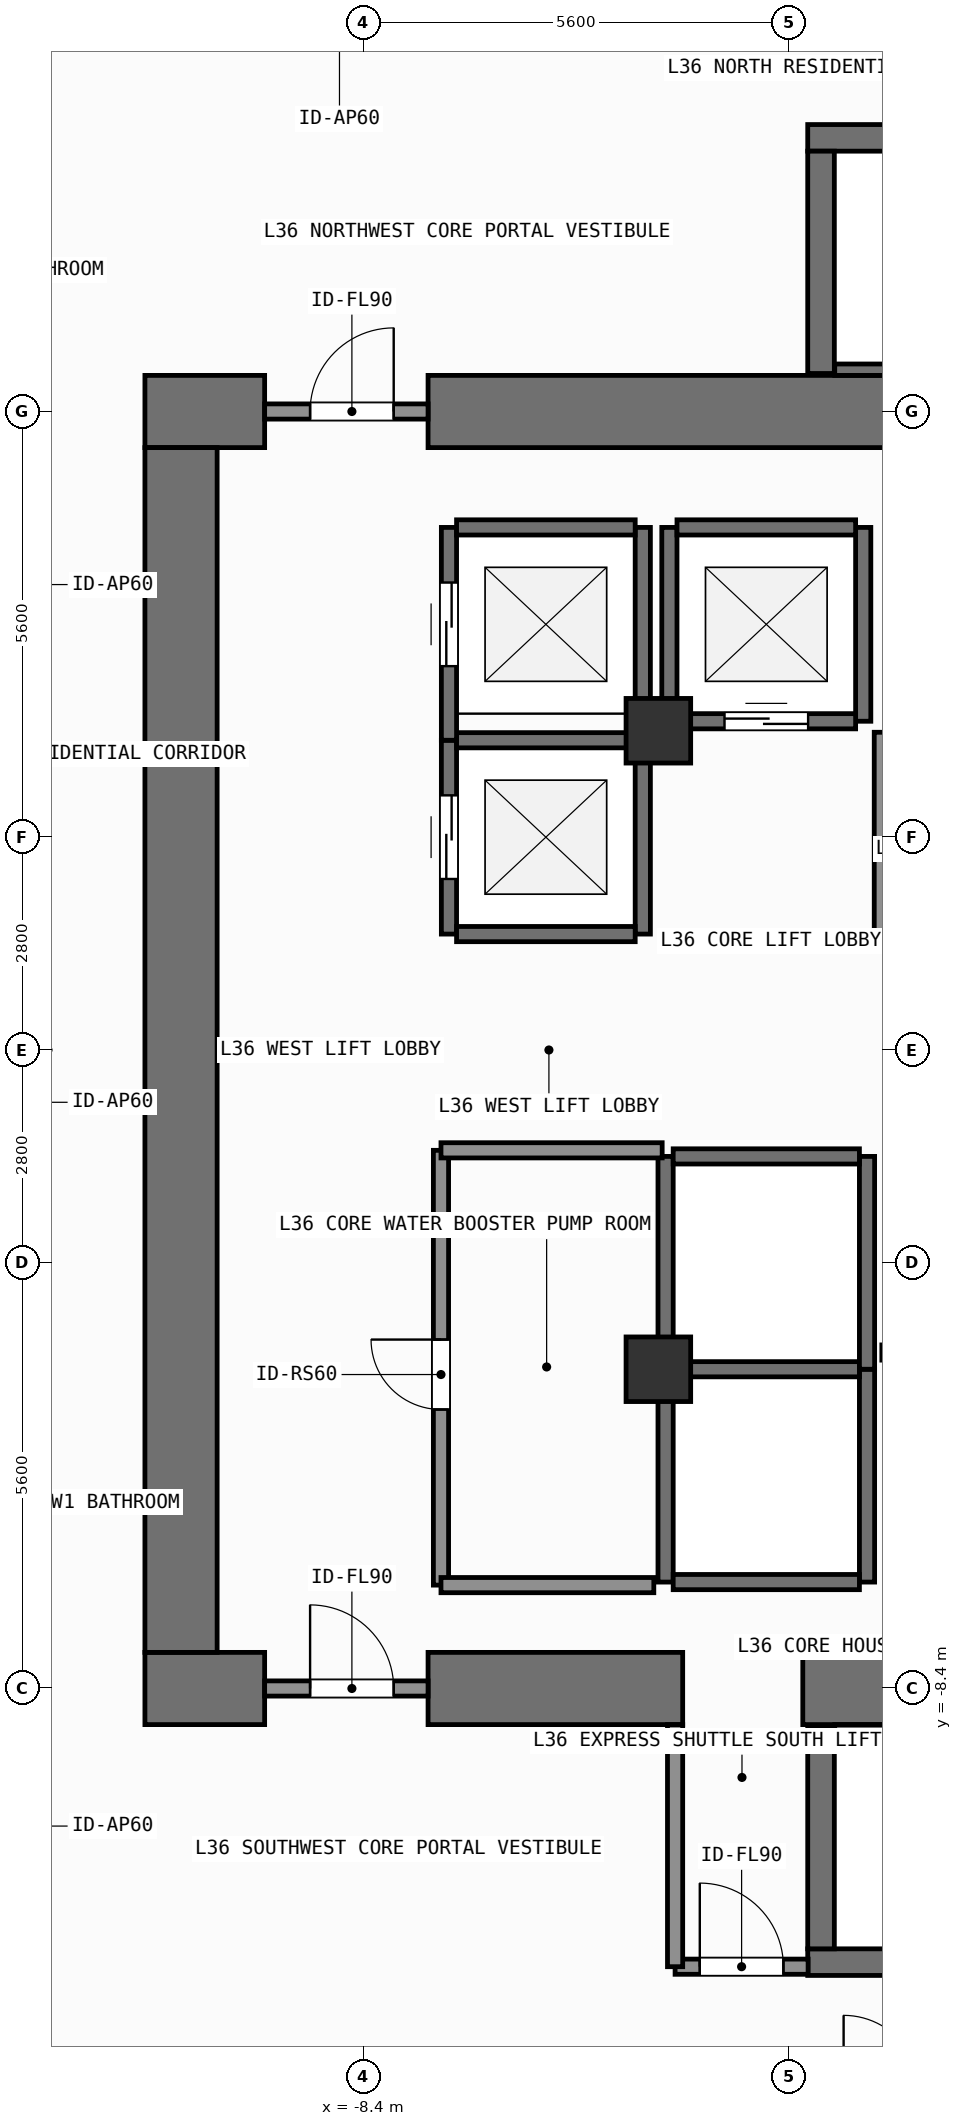
"""IFC4 building model, lengths in metres.
Left out: names, types, materials, properties, quantities, classifications, styles, units other than length and angle.
Written with IfcOpenShell. Run it as: python <this file> out.ifc"""

import sys

from ifc_helpers import new_model, si_unit, direction, frame, frame_2d, origin, origin_2d, place, context, subcontext, project, spatial, rectangle, extrude, element, fill, save


model = new_model("IFC4")
c1 = context("Model", 3, precision=1e-05, world=origin(), true_north=direction((0.0, 1.0)))
c2 = subcontext(c1, "Body", "Model", "MODEL_VIEW")
j1 = project(units=[si_unit("LENGTHUNIT", "METRE"), si_unit("PLANEANGLEUNIT", "RADIAN")], contexts=[c1])
p1 = place(None, origin())
s1 = spatial("IfcSite", under=j1, at=p1, CompositionType="ELEMENT")
p2 = place(p1, origin())
s2 = spatial("IfcBuilding", under=s1, at=p2, CompositionType="ELEMENT")
p3 = place(p2, frame((0.0, 0.0, 144.6)))
s3 = spatial("IfcBuildingStorey", under=s2, at=p3, CompositionType="ELEMENT", Elevation=144.6)
p4 = place(p3, frame((-11.275, -8.4, 0.0), z_axis=(0.0, 0.0, 1.0), x_axis=(1.0, 0.0, 0.0)))
e1 = element("IfcWall", 1, at=p4, inside=s3, PredefinedType="SHEAR", context=c2, shape_type="SweptSolid", body=[
    extrude(rectangle(XDim=1.575, YDim=0.95, at=frame_2d((0.788, 0.0))), origin(), (0.0, 0.0, 1.0), 3.9),
])
p5 = place(p3, frame((-7.55, -8.4, 0.0), z_axis=(0.0, 0.0, 1.0), x_axis=(1.0, 0.0, 0.0)))
e2 = element("IfcWall", 2, at=p5, inside=s3, PredefinedType="SHEAR", context=c2, shape_type="SweptSolid", body=[
    extrude(rectangle(XDim=3.35, YDim=0.95, at=frame_2d((1.675, 0.0))), origin(), (0.0, 0.0, 1.0), 3.9),
])
p6 = place(p3, frame((-2.62, -8.4, 0.0), z_axis=(0.0, 0.0, 1.0), x_axis=(1.0, 0.0, 0.0)))
e3 = element("IfcWall", 3, at=p6, inside=s3, PredefinedType="SHEAR", context=c2, shape_type="SweptSolid", body=[
    extrude(rectangle(XDim=7.27, YDim=0.95, at=frame_2d((3.635, 0.0))), origin(), (0.0, 0.0, 1.0), 3.9),
])
p7 = place(p3, frame((-11.275, 8.4, 0.0), z_axis=(0.0, 0.0, 1.0), x_axis=(1.0, 0.0, 0.0)))
e4 = element("IfcWall", 4, at=p7, inside=s3, PredefinedType="SHEAR", context=c2, shape_type="SweptSolid", body=[
    extrude(rectangle(XDim=1.575, YDim=0.95, at=frame_2d((0.788, 0.0))), origin(), (0.0, 0.0, 1.0), 3.9),
])
p8 = place(p3, frame((-7.55, 8.4, 0.0), z_axis=(0.0, 0.0, 1.0), x_axis=(1.0, 0.0, 0.0)))
e5 = element("IfcWall", 5, at=p8, inside=s3, PredefinedType="SHEAR", context=c2, shape_type="SweptSolid", body=[
    extrude(rectangle(XDim=16.425, YDim=0.95, at=frame_2d((8.212, 0.0))), origin(), (0.0, 0.0, 1.0), 3.9),
])
p9 = place(p3, frame((-10.8, -7.925, 0.0), z_axis=(0.0, 0.0, 1.0), x_axis=(0.0, 1.0, 0.0)))
e6 = element("IfcWall", 6, at=p9, inside=s3, PredefinedType="SHEAR", context=c2, shape_type="SweptSolid", body=[
    extrude(rectangle(XDim=15.85, YDim=0.95, at=frame_2d((7.925, 0.0))), origin(), (0.0, 0.0, 1.0), 3.9),
])
p10 = place(p3, frame((-2.555, -12.0, 0.0), z_axis=(0.0, 0.0, 1.0), x_axis=(1.0, 0.0, 0.0)))
e7 = element("IfcWall", 7, at=p10, inside=s3, PredefinedType="SHEAR", context=c2, shape_type="SweptSolid", body=[
    extrude(rectangle(XDim=7.31, YDim=0.35, at=frame_2d((3.655, 0.0))), origin(), (0.0, 0.0, 1.0), 3.9),
])
p11 = place(p3, frame((-2.2, -8.95, 0.0), z_axis=(0.0, 0.0, 1.0), x_axis=(1.0, 0.0, 0.0)))
e8 = element("IfcWall", 8, at=p11, inside=s3, PredefinedType="SHEAR", context=c2, shape_type="SweptSolid", body=[
    extrude(rectangle(XDim=6.6, YDim=0.15, at=frame_2d((3.3, 0.0))), origin(), (0.0, 0.0, 1.0), 3.9),
])
p12 = place(p3, frame((-2.38, -11.825, 0.0), z_axis=(0.0, 0.0, 1.0), x_axis=(0.0, 1.0, 0.0)))
e9 = element("IfcWall", 9, at=p12, inside=s3, PredefinedType="SHEAR", context=c2, shape_type="SweptSolid", body=[
    extrude(rectangle(XDim=2.925, YDim=0.35, at=frame_2d((1.462, 0.0))), origin(), (0.0, 0.0, 1.0), 3.9),
])
p13 = place(p3, frame((-2.555, 12.0, 0.0), z_axis=(0.0, 0.0, 1.0), x_axis=(1.0, 0.0, 0.0)))
e10 = element("IfcWall", 10, at=p13, inside=s3, PredefinedType="SHEAR", context=c2, shape_type="SweptSolid", body=[
    extrude(rectangle(XDim=7.31, YDim=0.35, at=frame_2d((3.655, 0.0))), origin(), (0.0, 0.0, 1.0), 3.9),
])
p14 = place(p3, frame((-2.2, 8.95, 0.0), z_axis=(0.0, 0.0, 1.0), x_axis=(1.0, 0.0, 0.0)))
e11 = element("IfcWall", 11, at=p14, inside=s3, PredefinedType="SHEAR", context=c2, shape_type="SweptSolid", body=[
    extrude(rectangle(XDim=6.6, YDim=0.15, at=frame_2d((3.3, 0.0))), origin(), (0.0, 0.0, 1.0), 3.9),
])
p15 = place(p3, frame((-2.38, 8.9, 0.0), z_axis=(0.0, 0.0, 1.0), x_axis=(0.0, 1.0, 0.0)))
e12 = element("IfcWall", 12, at=p15, inside=s3, PredefinedType="SHEAR", context=c2, shape_type="SweptSolid", body=[
    extrude(rectangle(XDim=2.925, YDim=0.35, at=frame_2d((1.462, 0.0))), origin(), (0.0, 0.0, 1.0), 3.9),
])
for number, where, z_axis, x_axis in (
    (13, (-4.52, -4.2, 0.0), (0.0, 0.0, 1.0), (1.0, 0.0, 0.0)),
    (14, (-4.52, 4.2, 0.0), (0.0, 0.0, 1.0), (1.0, 0.0, 0.0)),
):
    element("IfcColumn", number, at=place(p3, frame(where, z_axis=z_axis, x_axis=x_axis)), inside=s3, PredefinedType="COLUMN", context=c2, shape_type="SweptSolid", body=[
        extrude(rectangle(XDim=0.85, YDim=0.85, at=origin_2d()), origin(), (0.0, 0.0, 1.0), 3.9),
    ])
p16 = place(p3, frame((-7.275, 1.525, 0.0), z_axis=(0.0, 0.0, 1.0), x_axis=(0.0, 1.0, 0.0)))
e15 = element("IfcWall", 15, at=p16, inside=s3, PredefinedType="SHEAR", context=c2, shape_type="SweptSolid", body=[
    extrude(rectangle(XDim=2.55, YDim=0.2, at=frame_2d((1.275, 0.0))), origin(), (0.0, 0.0, 1.0), 3.68),
])
p17 = place(p16, frame((0.725, 0.0, 0.0)))
e16 = element("IfcOpeningElement", 16, at=p17, cuts=e15, PredefinedType="OPENING", context=c2, shape_type="SweptSolid", body=[
    extrude(rectangle(XDim=1.1, YDim=2.2, at=frame_2d((0.55, 1.1))), frame((0.0, 0.11, 0.0), z_axis=(0.0, -1.0, 0.0), x_axis=(1.0, 0.0, 0.0)), (0.0, 0.0, 1.0), 0.22),
])
p18 = place(p3, frame((-4.725, 1.525, 0.0), z_axis=(0.0, 0.0, 1.0), x_axis=(0.0, 1.0, 0.0)))
e17 = element("IfcWall", 17, at=p18, inside=s3, PredefinedType="SHEAR", context=c2, shape_type="SweptSolid", body=[
    extrude(rectangle(XDim=2.55, YDim=0.2, at=frame_2d((1.275, 0.0))), origin(), (0.0, 0.0, 1.0), 3.68),
])
for number, where, z_axis, x_axis in (
    (18, (-7.175, 1.525, 0.0), (0.0, 0.0, 1.0), (1.0, 0.0, 0.0)),
    (19, (-7.175, 4.075, 0.0), (0.0, 0.0, 1.0), (1.0, 0.0, 0.0)),
):
    element("IfcWall", number, at=place(p3, frame(where, z_axis=z_axis, x_axis=x_axis)), inside=s3, PredefinedType="SHEAR", context=c2, shape_type="SweptSolid", body=[
        extrude(rectangle(XDim=2.35, YDim=0.2, at=frame_2d((1.175, 0.0))), origin(), (0.0, 0.0, 1.0), 3.68),
    ])
p19 = place(p3, frame((-7.275, 4.075, 0.0), z_axis=(0.0, 0.0, 1.0), x_axis=(0.0, 1.0, 0.0)))
e20 = element("IfcWall", 20, at=p19, inside=s3, PredefinedType="SHEAR", context=c2, shape_type="SweptSolid", body=[
    extrude(rectangle(XDim=2.8, YDim=0.2, at=frame_2d((1.4, 0.0))), origin(), (0.0, 0.0, 1.0), 3.68),
])
p20 = place(p19, frame((0.975, 0.0, 0.0)))
e21 = element("IfcOpeningElement", 21, at=p20, cuts=e20, PredefinedType="OPENING", context=c2, shape_type="SweptSolid", body=[
    extrude(rectangle(XDim=1.1, YDim=2.2, at=frame_2d((0.55, 1.1))), frame((0.0, 0.11, 0.0), z_axis=(0.0, -1.0, 0.0), x_axis=(1.0, 0.0, 0.0)), (0.0, 0.0, 1.0), 0.22),
])
p21 = place(p3, frame((-4.725, 4.075, 0.0), z_axis=(0.0, 0.0, 1.0), x_axis=(0.0, 1.0, 0.0)))
e22 = element("IfcWall", 22, at=p21, inside=s3, PredefinedType="SHEAR", context=c2, shape_type="SweptSolid", body=[
    extrude(rectangle(XDim=2.8, YDim=0.2, at=frame_2d((1.4, 0.0))), origin(), (0.0, 0.0, 1.0), 3.68),
])
p22 = place(p3, frame((-7.175, 6.875, 0.0), z_axis=(0.0, 0.0, 1.0), x_axis=(1.0, 0.0, 0.0)))
e23 = element("IfcWall", 23, at=p22, inside=s3, PredefinedType="SHEAR", context=c2, shape_type="SweptSolid", body=[
    extrude(rectangle(XDim=2.35, YDim=0.2, at=frame_2d((1.175, 0.0))), origin(), (0.0, 0.0, 1.0), 3.68),
])
for number, where, z_axis, x_axis in (
    (24, (-4.375, 4.325, 0.0), (0.0, 0.0, 1.0), (0.0, 1.0, 0.0)),
    (25, (-1.825, 4.325, 0.0), (0.0, 0.0, 1.0), (0.0, 1.0, 0.0)),
):
    element("IfcWall", number, at=place(p3, frame(where, z_axis=z_axis, x_axis=x_axis)), inside=s3, PredefinedType="SHEAR", context=c2, shape_type="SweptSolid", body=[
        extrude(rectangle(XDim=2.55, YDim=0.2, at=frame_2d((1.275, 0.0))), origin(), (0.0, 0.0, 1.0), 3.68),
    ])
p23 = place(p3, frame((-4.275, 4.325, 0.0), z_axis=(0.0, 0.0, 1.0), x_axis=(1.0, 0.0, 0.0)))
e26 = element("IfcWall", 26, at=p23, inside=s3, PredefinedType="SHEAR", context=c2, shape_type="SweptSolid", body=[
    extrude(rectangle(XDim=2.35, YDim=0.2, at=frame_2d((1.175, 0.0))), origin(), (0.0, 0.0, 1.0), 3.68),
])
p24 = place(p23, frame((0.625, 0.0, 0.0)))
e27 = element("IfcOpeningElement", 27, at=p24, cuts=e26, PredefinedType="OPENING", context=c2, shape_type="SweptSolid", body=[
    extrude(rectangle(XDim=1.1, YDim=2.2, at=frame_2d((0.55, 1.1))), frame((0.0, 0.11, 0.0), z_axis=(0.0, -1.0, 0.0), x_axis=(1.0, 0.0, 0.0)), (0.0, 0.0, 1.0), 0.22),
])
p25 = place(p3, frame((-4.275, 6.875, 0.0), z_axis=(0.0, 0.0, 1.0), x_axis=(1.0, 0.0, 0.0)))
e28 = element("IfcWall", 28, at=p25, inside=s3, PredefinedType="SHEAR", context=c2, shape_type="SweptSolid", body=[
    extrude(rectangle(XDim=2.35, YDim=0.2, at=frame_2d((1.175, 0.0))), origin(), (0.0, 0.0, 1.0), 3.68),
])
for number, where, z_axis, x_axis in (
    (29, (-4.425, -7.0, 0.0), (0.0, 0.0, 1.0), (0.0, 1.0, 0.0)),
    (30, (-1.775, -7.0, 0.0), (0.0, 0.0, 1.0), (0.0, 1.0, 0.0)),
):
    element("IfcWall", number, at=place(p3, frame(where, z_axis=z_axis, x_axis=x_axis)), inside=s3, PredefinedType="SHEAR", context=c2, shape_type="SweptSolid", body=[
        extrude(rectangle(XDim=2.8, YDim=0.2, at=frame_2d((1.4, 0.0))), origin(), (0.0, 0.0, 1.0), 3.68),
    ])
for number, where, z_axis, x_axis in (
    (31, (-4.325, -7.0, 0.0), (0.0, 0.0, 1.0), (1.0, 0.0, 0.0)),
    (32, (-4.325, -4.2, 0.0), (0.0, 0.0, 1.0), (1.0, 0.0, 0.0)),
):
    element("IfcWall", number, at=place(p3, frame(where, z_axis=z_axis, x_axis=x_axis)), inside=s3, PredefinedType="SHEAR", context=c2, shape_type="SweptSolid", body=[
        extrude(rectangle(XDim=2.45, YDim=0.2, at=frame_2d((1.225, 0.0))), origin(), (0.0, 0.0, 1.0), 3.68),
    ])
for number, where, z_axis, x_axis in (
    (33, (-4.425, -4.2, 0.0), (0.0, 0.0, 1.0), (0.0, 1.0, 0.0)),
    (34, (-1.775, -4.2, 0.0), (0.0, 0.0, 1.0), (0.0, 1.0, 0.0)),
):
    element("IfcWall", number, at=place(p3, frame(where, z_axis=z_axis, x_axis=x_axis)), inside=s3, PredefinedType="SHEAR", context=c2, shape_type="SweptSolid", body=[
        extrude(rectangle(XDim=2.8, YDim=0.2, at=frame_2d((1.4, 0.0))), origin(), (0.0, 0.0, 1.0), 3.68),
    ])
p26 = place(p3, frame((-4.325, -1.4, 0.0), z_axis=(0.0, 0.0, 1.0), x_axis=(1.0, 0.0, 0.0)))
e35 = element("IfcWall", 35, at=p26, inside=s3, PredefinedType="SHEAR", context=c2, shape_type="SweptSolid", body=[
    extrude(rectangle(XDim=2.45, YDim=0.2, at=frame_2d((1.225, 0.0))), origin(), (0.0, 0.0, 1.0), 3.68),
])
p27 = place(p3, frame((-9.7, -8.4, 0.0), z_axis=(0.0, 0.0, 1.0), x_axis=(1.0, 0.0, 0.0)))
e36 = element("IfcWall", 36, at=p27, inside=s3, PredefinedType="SOLIDWALL", context=c2, shape_type="SweptSolid", body=[
    extrude(rectangle(XDim=2.15, YDim=0.2, at=frame_2d((1.075, 0.0))), origin(), (0.0, 0.0, 1.0), 2.72),
])
p28 = place(p27, frame((0.598, 0.0, 0.0)))
e37 = element("IfcOpeningElement", 37, at=p28, cuts=e36, PredefinedType="OPENING", context=c2, shape_type="SweptSolid", body=[
    extrude(rectangle(XDim=1.1, YDim=2.15, at=frame_2d((0.55, 1.075))), frame((0.0, 0.11, 0.0), z_axis=(0.0, -1.0, 0.0), x_axis=(1.0, 0.0, 0.0)), (0.0, 0.0, 1.0), 0.22),
])
p29 = place(p3, frame((-9.7, 8.4, 0.0), z_axis=(0.0, 0.0, 1.0), x_axis=(1.0, 0.0, 0.0)))
e38 = element("IfcWall", 38, at=p29, inside=s3, PredefinedType="SOLIDWALL", context=c2, shape_type="SweptSolid", body=[
    extrude(rectangle(XDim=2.15, YDim=0.2, at=frame_2d((1.075, 0.0))), origin(), (0.0, 0.0, 1.0), 2.72),
])
p30 = place(p29, frame((0.598, 0.0, 0.0)))
e39 = element("IfcOpeningElement", 39, at=p30, cuts=e38, PredefinedType="OPENING", context=c2, shape_type="SweptSolid", body=[
    extrude(rectangle(XDim=1.1, YDim=2.15, at=frame_2d((0.55, 1.075))), frame((0.0, 0.11, 0.0), z_axis=(0.0, -1.0, 0.0), x_axis=(1.0, 0.0, 0.0)), (0.0, 0.0, 1.0), 0.22),
])
p31 = place(p3, frame((-4.3, -12.06, 0.0), z_axis=(0.0, 0.0, 1.0), x_axis=(1.0, 0.0, 0.0)))
e40 = element("IfcWall", 40, at=p31, inside=s3, PredefinedType="SOLIDWALL", context=c2, shape_type="SweptSolid", body=[
    extrude(rectangle(XDim=1.75, YDim=0.2, at=frame_2d((0.875, 0.0))), origin(), (0.0, 0.0, 1.0), 3.68),
])
p32 = place(p31, frame((0.325, 0.0, 0.0)))
e41 = element("IfcOpeningElement", 41, at=p32, cuts=e40, PredefinedType="OPENING", context=c2, shape_type="SweptSolid", body=[
    extrude(rectangle(XDim=1.1, YDim=2.15, at=frame_2d((0.55, 1.075))), frame((0.0, 0.11, 0.0), z_axis=(0.0, -1.0, 0.0), x_axis=(1.0, 0.0, 0.0)), (0.0, 0.0, 1.0), 0.22),
])
p33 = place(p3, frame((-7.38, -7.04, 0.0), z_axis=(0.0, 0.0, 1.0), x_axis=(0.0, 1.0, 0.0)))
e42 = element("IfcWall", 42, at=p33, inside=s3, PredefinedType="SOLIDWALL", context=c2, shape_type="SweptSolid", body=[
    extrude(rectangle(XDim=5.72, YDim=0.2, at=frame_2d((2.86, 0.0))), origin(), (0.0, 0.0, 1.0), 3.68),
])
p34 = place(p33, frame((2.31, 0.0, 0.0)))
e43 = element("IfcOpeningElement", 43, at=p34, cuts=e42, PredefinedType="OPENING", context=c2, shape_type="SweptSolid", body=[
    extrude(rectangle(XDim=0.92, YDim=2.1, at=frame_2d((0.46, 1.05))), frame((0.0, 0.11, 0.0), z_axis=(0.0, -1.0, 0.0), x_axis=(1.0, 0.0, 0.0)), (0.0, 0.0, 1.0), 0.22),
])
p35 = place(p3, frame((-4.3, -12.06, 0.0), z_axis=(0.0, 0.0, 1.0), x_axis=(0.0, 1.0, 0.0)))
e44 = element("IfcWall", 44, at=p35, inside=s3, PredefinedType="SOLIDWALL", context=c2, shape_type="SweptSolid", body=[
    extrude(rectangle(XDim=3.185, YDim=0.2, at=frame_2d((1.593, 0.0))), origin(), (0.0, 0.0, 1.0), 3.68),
])
p36 = place(p3, frame((-7.38, -1.32, 0.0), z_axis=(0.0, 0.0, 1.0), x_axis=(1.0, 0.0, 0.0)))
e45 = element("IfcWall", 45, at=p36, inside=s3, PredefinedType="SOLIDWALL", context=c2, shape_type="SweptSolid", body=[
    extrude(rectangle(XDim=2.91, YDim=0.2, at=frame_2d((1.455, 0.0))), origin(), (0.0, 0.0, 1.0), 3.68),
])
p37 = place(p3, frame((-1.58, 1.48, 0.0), z_axis=(0.0, 0.0, 1.0), x_axis=(0.0, 1.0, 0.0)))
e46 = element("IfcWall", 46, at=p37, inside=s3, PredefinedType="SOLIDWALL", context=c2, shape_type="SweptSolid", body=[
    extrude(rectangle(XDim=2.7, YDim=0.2, at=frame_2d((1.35, 0.0))), origin(), (0.0, 0.0, 1.0), 3.68),
])
p38 = place(p3, frame((-7.38, -7.04, 0.0), z_axis=(0.0, 0.0, 1.0), x_axis=(1.0, 0.0, 0.0)))
e47 = element("IfcWall", 47, at=p38, inside=s3, PredefinedType="SOLIDWALL", context=c2, shape_type="SweptSolid", body=[
    extrude(rectangle(XDim=2.8, YDim=0.2, at=frame_2d((1.4, 0.0))), origin(), (0.0, 0.0, 1.0), 3.68),
])
p39 = place(p17, origin())
e48 = element("IfcDoor", 48, at=p39, inside=s3, OperationType="SLIDING_TO_LEFT", PredefinedType="DOOR", context=c2, shape_type="SweptSolid", body=[
    extrude(rectangle(XDim=1.1, YDim=2.2, at=frame_2d((0.55, 1.1))), frame((0.0, 0.025, 0.0), z_axis=(0.0, -1.0, 0.0), x_axis=(1.0, 0.0, 0.0)), (0.0, 0.0, 1.0), 0.05),
])
fill(e16, e48)
p40 = place(p20, origin())
e49 = element("IfcDoor", 49, at=p40, inside=s3, OperationType="SLIDING_TO_LEFT", PredefinedType="DOOR", context=c2, shape_type="SweptSolid", body=[
    extrude(rectangle(XDim=1.1, YDim=2.2, at=frame_2d((0.55, 1.1))), frame((0.0, 0.025, 0.0), z_axis=(0.0, -1.0, 0.0), x_axis=(1.0, 0.0, 0.0)), (0.0, 0.0, 1.0), 0.05),
])
fill(e21, e49)
p41 = place(p24, origin())
e50 = element("IfcDoor", 50, at=p41, inside=s3, OperationType="SLIDING_TO_LEFT", PredefinedType="DOOR", context=c2, shape_type="SweptSolid", body=[
    extrude(rectangle(XDim=1.1, YDim=2.2, at=frame_2d((0.55, 1.1))), frame((0.0, 0.025, 0.0), z_axis=(0.0, -1.0, 0.0), x_axis=(1.0, 0.0, 0.0)), (0.0, 0.0, 1.0), 0.05),
])
fill(e27, e50)
p42 = place(p28, origin())
e51 = element("IfcDoor", 51, at=p42, inside=s3, OperationType="SINGLE_SWING_LEFT", PredefinedType="DOOR", context=c2, shape_type="SweptSolid", body=[
    extrude(rectangle(XDim=1.1, YDim=2.15, at=frame_2d((0.55, 1.075))), frame((0.0, 0.025, 0.0), z_axis=(0.0, -1.0, 0.0), x_axis=(1.0, 0.0, 0.0)), (0.0, 0.0, 1.0), 0.05),
])
fill(e37, e51)
p43 = place(p30, origin())
e52 = element("IfcDoor", 52, at=p43, inside=s3, OperationType="SINGLE_SWING_RIGHT", PredefinedType="DOOR", context=c2, shape_type="SweptSolid", body=[
    extrude(rectangle(XDim=1.1, YDim=2.15, at=frame_2d((0.55, 1.075))), frame((0.0, 0.025, 0.0), z_axis=(0.0, -1.0, 0.0), x_axis=(1.0, 0.0, 0.0)), (0.0, 0.0, 1.0), 0.05),
])
fill(e39, e52)
p44 = place(p32, origin())
e53 = element("IfcDoor", 53, at=p44, inside=s3, OperationType="SINGLE_SWING_LEFT", PredefinedType="DOOR", context=c2, shape_type="SweptSolid", body=[
    extrude(rectangle(XDim=1.1, YDim=2.15, at=frame_2d((0.55, 1.075))), frame((0.0, 0.025, 0.0), z_axis=(0.0, -1.0, 0.0), x_axis=(1.0, 0.0, 0.0)), (0.0, 0.0, 1.0), 0.05),
])
fill(e41, e53)
p45 = place(p34, origin())
e54 = element("IfcDoor", 54, at=p45, inside=s3, OperationType="SINGLE_SWING_RIGHT", PredefinedType="DOOR", context=c2, shape_type="SweptSolid", body=[
    extrude(rectangle(XDim=0.92, YDim=2.1, at=frame_2d((0.46, 1.05))), frame((0.0, 0.025, 0.0), z_axis=(0.0, -1.0, 0.0), x_axis=(1.0, 0.0, 0.0)), (0.0, 0.0, 1.0), 0.05),
])
fill(e43, e54)
save(model, sys.argv[1])
